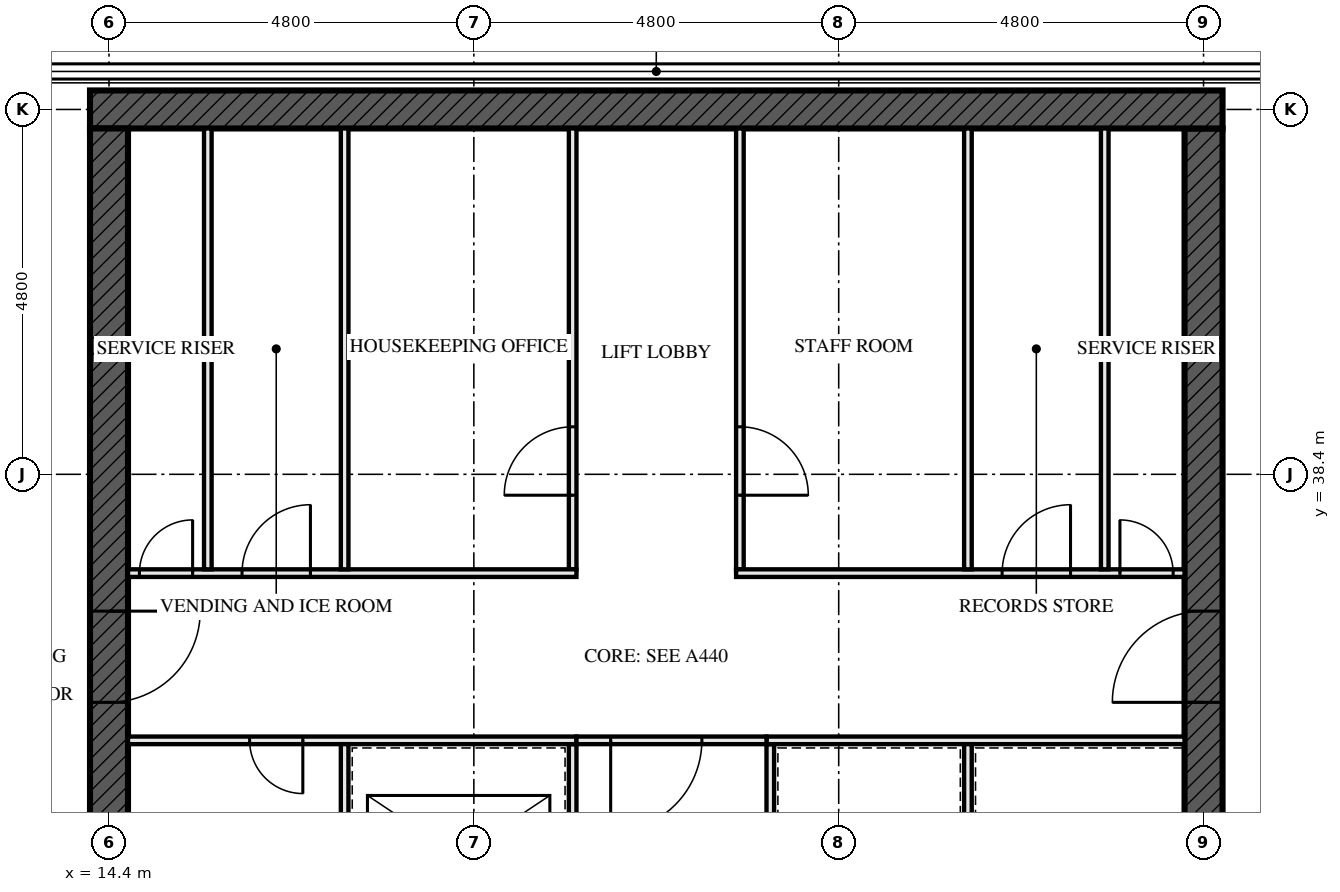
"""IFC4 building model, lengths in metres.
Left out: names, types, materials, properties, quantities, classifications, styles, units other than length and angle.
Written with IfcOpenShell. Run it as: python <this file> out.ifc"""

import sys

from ifc_helpers import new_model, si_unit, direction, frame, frame_2d, origin, place, context, subcontext, project, spatial, rectangle, extrude, element, fill, save


model = new_model("IFC4")
c1 = context("Model", 3, precision=1e-05, world=origin(), true_north=direction((0.0, 1.0)))
c2 = subcontext(c1, "Body", "Model", "MODEL_VIEW")
j1 = project(units=[si_unit("LENGTHUNIT", "METRE"), si_unit("PLANEANGLEUNIT", "RADIAN")], contexts=[c1])
p1 = place(None, origin())
s1 = spatial("IfcSite", under=j1, at=p1, CompositionType="ELEMENT")
p2 = place(p1, origin())
s2 = spatial("IfcBuilding", under=s1, at=p2, CompositionType="ELEMENT")
p3 = place(p2, frame((0.0, 0.0, 243.5)))
s3 = spatial("IfcBuildingStorey", under=s2, at=p3, CompositionType="ELEMENT", Elevation=243.5)
p4 = place(p3, frame((29.05, 43.2, -0.25), z_axis=(0.0, 0.0, 1.0), x_axis=(-1.0, 0.0, 0.0)))
e1 = element("IfcWall", 1, at=p4, inside=s3, PredefinedType="SHEAR", context=c2, shape_type="SweptSolid", body=[
    extrude(rectangle(XDim=14.9, YDim=0.5, at=frame_2d((7.45, 0.0))), origin(), (0.0, 0.0, 1.0), 4.5),
])
p5 = place(p3, frame((14.4, 42.95, -0.25), z_axis=(0.0, 0.0, 1.0), x_axis=(0.0, -1.0, 0.0)))
e2 = element("IfcWall", 2, at=p5, inside=s3, PredefinedType="SHEAR", context=c2, shape_type="SweptSolid", body=[
    extrude(rectangle(XDim=13.9, YDim=0.5, at=frame_2d((6.95, 0.0))), origin(), (0.0, 0.0, 1.0), 4.5),
])
p6 = place(p5, frame((6.35, 0.0, 0.25)))
e3 = element("IfcOpeningElement", 3, at=p6, cuts=e2, PredefinedType="OPENING", context=c2, shape_type="SweptSolid", body=[
    extrude(rectangle(XDim=1.2, YDim=2.1, at=frame_2d((0.6, 1.05))), frame((0.0, 0.26, 0.0), z_axis=(0.0, -1.0, 0.0), x_axis=(1.0, 0.0, 0.0)), (0.0, 0.0, 1.0), 0.521),
])
p7 = place(p3, frame((28.8, 29.05, -0.25), z_axis=(0.0, 0.0, 1.0), x_axis=(0.0, 1.0, 0.0)))
e4 = element("IfcWall", 4, at=p7, inside=s3, PredefinedType="SHEAR", context=c2, shape_type="SweptSolid", body=[
    extrude(rectangle(XDim=13.9, YDim=0.5, at=frame_2d((6.95, 0.0))), origin(), (0.0, 0.0, 1.0), 4.5),
])
p8 = place(p7, frame((6.35, 0.0, 0.25)))
e5 = element("IfcOpeningElement", 5, at=p8, cuts=e4, PredefinedType="OPENING", context=c2, shape_type="SweptSolid", body=[
    extrude(rectangle(XDim=1.2, YDim=2.1, at=frame_2d((0.6, 1.05))), frame((0.0, 0.26, 0.0), z_axis=(0.0, -1.0, 0.0), x_axis=(1.0, 0.0, 0.0)), (0.0, 0.0, 1.0), 0.521),
])
for number, where, z_axis, x_axis in (
    (6, (15.7, 37.15, 0.0), (0.0, 0.0, 1.0), (0.0, 1.0, 0.0)),
    (7, (27.5, 37.15, 0.0), (0.0, 0.0, 1.0), (0.0, 1.0, 0.0)),
):
    element("IfcWall", number, at=place(p3, frame(where, z_axis=z_axis, x_axis=x_axis)), inside=s3, PredefinedType="SOLIDWALL", context=c2, shape_type="SweptSolid", body=[
        extrude(rectangle(XDim=5.8, YDim=0.1, at=frame_2d((2.9, 0.0))), origin(), (0.0, 0.0, 1.0), 4.25),
    ])
p9 = place(p3, frame((20.5, 29.05, 0.0), z_axis=(0.0, 0.0, 1.0), x_axis=(0.0, 1.0, 0.0)))
e8 = element("IfcWall", 8, at=p9, inside=s3, PredefinedType="SOLIDWALL", context=c2, shape_type="SweptSolid", body=[
    extrude(rectangle(XDim=5.8, YDim=0.1, at=frame_2d((2.9, 0.0))), origin(), (0.0, 0.0, 1.0), 4.25),
])
p10 = place(p9, frame((0.8, 0.0, 0.0)))
e9 = element("IfcOpeningElement", 9, at=p10, cuts=e8, PredefinedType="OPENING", context=c2, shape_type="SweptSolid", body=[
    extrude(rectangle(XDim=1.1, YDim=2.3, at=frame_2d((0.55, 1.15))), frame((0.0, 0.061, 0.0), z_axis=(0.0, -1.0, 0.0), x_axis=(1.0, 0.0, 0.0)), (0.0, 0.0, 1.0), 0.121),
])
p11 = place(p9, frame((3.775, 0.0, 0.0)))
e10 = element("IfcOpeningElement", 10, at=p11, cuts=e8, PredefinedType="OPENING", context=c2, shape_type="SweptSolid", body=[
    extrude(rectangle(XDim=1.1, YDim=2.3, at=frame_2d((0.55, 1.15))), frame((0.0, 0.061, 0.0), z_axis=(0.0, -1.0, 0.0), x_axis=(1.0, 0.0, 0.0)), (0.0, 0.0, 1.0), 0.121),
])
p12 = place(p3, frame((20.5, 37.15, 0.0), z_axis=(0.0, 0.0, 1.0), x_axis=(0.0, 1.0, 0.0)))
e11 = element("IfcWall", 11, at=p12, inside=s3, PredefinedType="SOLIDWALL", context=c2, shape_type="SweptSolid", body=[
    extrude(rectangle(XDim=5.8, YDim=0.1, at=frame_2d((2.9, 0.0))), origin(), (0.0, 0.0, 1.0), 4.25),
])
p13 = place(p12, frame((0.975, 0.0, 0.0)))
e12 = element("IfcOpeningElement", 12, at=p13, cuts=e11, PredefinedType="OPENING", context=c2, shape_type="SweptSolid", body=[
    extrude(rectangle(XDim=0.9, YDim=2.1, at=frame_2d((0.45, 1.05))), frame((0.0, 0.061, 0.0), z_axis=(0.0, -1.0, 0.0), x_axis=(1.0, 0.0, 0.0)), (0.0, 0.0, 1.0), 0.121),
])
p14 = place(p3, frame((22.7, 37.15, 0.0), z_axis=(0.0, 0.0, 1.0), x_axis=(0.0, 1.0, 0.0)))
e13 = element("IfcWall", 13, at=p14, inside=s3, PredefinedType="SOLIDWALL", context=c2, shape_type="SweptSolid", body=[
    extrude(rectangle(XDim=5.8, YDim=0.1, at=frame_2d((2.9, 0.0))), origin(), (0.0, 0.0, 1.0), 4.25),
])
p15 = place(p14, frame((0.975, 0.0, 0.0)))
e14 = element("IfcOpeningElement", 14, at=p15, cuts=e13, PredefinedType="OPENING", context=c2, shape_type="SweptSolid", body=[
    extrude(rectangle(XDim=0.9, YDim=2.1, at=frame_2d((0.45, 1.05))), frame((0.0, 0.061, 0.0), z_axis=(0.0, -1.0, 0.0), x_axis=(1.0, 0.0, 0.0)), (0.0, 0.0, 1.0), 0.121),
])
p16 = place(p3, frame((23.1, 29.05, 0.0), z_axis=(0.0, 0.0, 1.0), x_axis=(0.0, 1.0, 0.0)))
e15 = element("IfcWall", 15, at=p16, inside=s3, PredefinedType="SOLIDWALL", context=c2, shape_type="SweptSolid", body=[
    extrude(rectangle(XDim=5.8, YDim=0.1, at=frame_2d((2.9, 0.0))), origin(), (0.0, 0.0, 1.0), 4.25),
])
p17 = place(p16, frame((1.0, 0.0, 0.0)))
e16 = element("IfcOpeningElement", 16, at=p17, cuts=e15, PredefinedType="OPENING", context=c2, shape_type="SweptSolid", body=[
    extrude(rectangle(XDim=0.7, YDim=2.1, at=frame_2d((0.35, 1.05))), frame((0.0, 0.061, 0.0), z_axis=(0.0, -1.0, 0.0), x_axis=(1.0, 0.0, 0.0)), (0.0, 0.0, 1.0), 0.121),
])
p18 = place(p3, frame((14.65, 34.9, 0.0), z_axis=(0.0, 0.0, 1.0), x_axis=(1.0, 0.0, 0.0)))
e17 = element("IfcWall", 17, at=p18, inside=s3, PredefinedType="SOLIDWALL", context=c2, shape_type="SweptSolid", body=[
    extrude(rectangle(XDim=5.9, YDim=0.1, at=frame_2d((2.95, 0.0))), origin(), (0.0, 0.0, 1.0), 4.25),
])
p19 = place(p18, frame((1.6, 0.0, 0.0)))
e18 = element("IfcOpeningElement", 18, at=p19, cuts=e17, PredefinedType="OPENING", context=c2, shape_type="SweptSolid", body=[
    extrude(rectangle(XDim=0.7, YDim=2.1, at=frame_2d((0.35, 1.05))), frame((0.0, 0.061, 0.0), z_axis=(0.0, -1.0, 0.0), x_axis=(1.0, 0.0, 0.0)), (0.0, 0.0, 1.0), 0.121),
])
p20 = place(p3, frame((23.05, 34.9, 0.0), z_axis=(0.0, 0.0, 1.0), x_axis=(1.0, 0.0, 0.0)))
e19 = element("IfcWall", 19, at=p20, inside=s3, PredefinedType="SOLIDWALL", context=c2, shape_type="SweptSolid", body=[
    extrude(rectangle(XDim=5.5, YDim=0.1, at=frame_2d((2.75, 0.0))), origin(), (0.0, 0.0, 1.0), 4.25),
])
p21 = place(p3, frame((14.65, 37.1, 0.0), z_axis=(0.0, 0.0, 1.0), x_axis=(1.0, 0.0, 0.0)))
e20 = element("IfcWall", 20, at=p21, inside=s3, PredefinedType="SOLIDWALL", context=c2, shape_type="SweptSolid", body=[
    extrude(rectangle(XDim=5.9, YDim=0.1, at=frame_2d((2.95, 0.0))), origin(), (0.0, 0.0, 1.0), 4.25),
])
p22 = place(p21, frame((0.15, 0.0, 0.0)))
e21 = element("IfcOpeningElement", 21, at=p22, cuts=e20, PredefinedType="OPENING", context=c2, shape_type="SweptSolid", body=[
    extrude(rectangle(XDim=0.7, YDim=2.1, at=frame_2d((0.35, 1.05))), frame((0.0, 0.061, 0.0), z_axis=(0.0, -1.0, 0.0), x_axis=(1.0, 0.0, 0.0)), (0.0, 0.0, 1.0), 0.121),
])
p23 = place(p21, frame((1.5, 0.0, 0.0)))
e22 = element("IfcOpeningElement", 22, at=p23, cuts=e20, PredefinedType="OPENING", context=c2, shape_type="SweptSolid", body=[
    extrude(rectangle(XDim=0.9, YDim=2.1, at=frame_2d((0.45, 1.05))), frame((0.0, 0.061, 0.0), z_axis=(0.0, -1.0, 0.0), x_axis=(1.0, 0.0, 0.0)), (0.0, 0.0, 1.0), 0.121),
])
p24 = place(p3, frame((22.65, 37.1, 0.0), z_axis=(0.0, 0.0, 1.0), x_axis=(1.0, 0.0, 0.0)))
e23 = element("IfcWall", 23, at=p24, inside=s3, PredefinedType="SOLIDWALL", context=c2, shape_type="SweptSolid", body=[
    extrude(rectangle(XDim=5.9, YDim=0.1, at=frame_2d((2.95, 0.0))), origin(), (0.0, 0.0, 1.0), 4.25),
])
p25 = place(p24, frame((3.5, 0.0, 0.0)))
e24 = element("IfcOpeningElement", 24, at=p25, cuts=e23, PredefinedType="OPENING", context=c2, shape_type="SweptSolid", body=[
    extrude(rectangle(XDim=0.9, YDim=2.1, at=frame_2d((0.45, 1.05))), frame((0.0, 0.061, 0.0), z_axis=(0.0, -1.0, 0.0), x_axis=(1.0, 0.0, 0.0)), (0.0, 0.0, 1.0), 0.121),
])
p26 = place(p24, frame((5.05, 0.0, 0.0)))
e25 = element("IfcOpeningElement", 25, at=p26, cuts=e23, PredefinedType="OPENING", context=c2, shape_type="SweptSolid", body=[
    extrude(rectangle(XDim=0.7, YDim=2.1, at=frame_2d((0.35, 1.05))), frame((0.0, 0.061, 0.0), z_axis=(0.0, -1.0, 0.0), x_axis=(1.0, 0.0, 0.0)), (0.0, 0.0, 1.0), 0.121),
])
p27 = place(p3, frame((20.55, 34.9, 0.0), z_axis=(0.0, 0.0, 1.0), x_axis=(1.0, 0.0, 0.0)))
e26 = element("IfcWall", 26, at=p27, inside=s3, PredefinedType="SOLIDWALL", context=c2, shape_type="SweptSolid", body=[
    extrude(rectangle(XDim=2.5, YDim=0.1, at=frame_2d((1.25, 0.0))), origin(), (0.0, 0.0, 1.0), 4.25),
])
p28 = place(p27, frame((0.45, 0.0, 0.0)))
e27 = element("IfcOpeningElement", 27, at=p28, cuts=e26, PredefinedType="OPENING", context=c2, shape_type="SweptSolid", body=[
    extrude(rectangle(XDim=1.2, YDim=2.1, at=frame_2d((0.6, 1.05))), frame((0.0, 0.061, 0.0), z_axis=(0.0, -1.0, 0.0), x_axis=(1.0, 0.0, 0.0)), (0.0, 0.0, 1.0), 0.121),
])
for number, where, z_axis, x_axis in (
    (28, (17.5, 29.05, 0.0), (0.0, 0.0, 1.0), (0.0, 1.0, 0.0)),
    (29, (17.5, 37.15, 0.0), (0.0, 0.0, 1.0), (0.0, 1.0, 0.0)),
    (30, (25.7, 37.15, 0.0), (0.0, 0.0, 1.0), (0.0, 1.0, 0.0)),
):
    element("IfcWall", number, at=place(p3, frame(where, z_axis=z_axis, x_axis=x_axis)), inside=s3, PredefinedType="SOLIDWALL", context=c2, shape_type="SweptSolid", body=[
        extrude(rectangle(XDim=5.8, YDim=0.1, at=frame_2d((2.9, 0.0))), origin(), (0.0, 0.0, 1.0), 4.25),
    ])
p29 = place(p3, frame((25.7, 31.95, 0.0), z_axis=(0.0, 0.0, 1.0), x_axis=(0.0, 1.0, 0.0)))
e31 = element("IfcWall", 31, at=p29, inside=s3, PredefinedType="SOLIDWALL", context=c2, shape_type="SweptSolid", body=[
    extrude(rectangle(XDim=2.9, YDim=0.1, at=frame_2d((1.45, 0.0))), origin(), (0.0, 0.0, 1.0), 4.25),
])
p30 = place(p13, origin())
e32 = element("IfcDoor", 32, at=p30, inside=s3, OperationType="SINGLE_SWING_RIGHT", PredefinedType="DOOR", context=c2, shape_type="SweptSolid", body=[
    extrude(rectangle(XDim=0.9, YDim=2.1, at=frame_2d((0.45, 1.05))), frame((0.0, 0.027, 0.0), z_axis=(0.0, -1.0, 0.0), x_axis=(1.0, 0.0, 0.0)), (0.0, 0.0, 1.0), 0.054),
])
fill(e12, e32)
p31 = place(p15, frame((0.9, 0.0, 0.0), z_axis=(0.0, 0.0, 1.0), x_axis=(-1.0, 0.0, 0.0)))
e33 = element("IfcDoor", 33, at=p31, inside=s3, OperationType="SINGLE_SWING_LEFT", PredefinedType="DOOR", context=c2, shape_type="SweptSolid", body=[
    extrude(rectangle(XDim=0.9, YDim=2.1, at=frame_2d((0.45, 1.05))), frame((0.0, 0.027, 0.0), z_axis=(0.0, -1.0, 0.0), x_axis=(1.0, 0.0, 0.0)), (0.0, 0.0, 1.0), 0.054),
])
fill(e14, e33)
p32 = place(p19, frame((0.7, 0.0, 0.0), z_axis=(0.0, 0.0, 1.0), x_axis=(-1.0, 0.0, 0.0)))
e34 = element("IfcDoor", 34, at=p32, inside=s3, OperationType="SINGLE_SWING_RIGHT", PredefinedType="DOOR", context=c2, shape_type="SweptSolid", body=[
    extrude(rectangle(XDim=0.7, YDim=2.1, at=frame_2d((0.35, 1.05))), frame((0.0, 0.027, 0.0), z_axis=(0.0, -1.0, 0.0), x_axis=(1.0, 0.0, 0.0)), (0.0, 0.0, 1.0), 0.054),
])
fill(e18, e34)
p33 = place(p22, origin())
e35 = element("IfcDoor", 35, at=p33, inside=s3, OperationType="SINGLE_SWING_LEFT", PredefinedType="DOOR", context=c2, shape_type="SweptSolid", body=[
    extrude(rectangle(XDim=0.7, YDim=2.1, at=frame_2d((0.35, 1.05))), frame((0.0, 0.027, 0.0), z_axis=(0.0, -1.0, 0.0), x_axis=(1.0, 0.0, 0.0)), (0.0, 0.0, 1.0), 0.054),
])
fill(e21, e35)
p34 = place(p23, origin())
e36 = element("IfcDoor", 36, at=p34, inside=s3, OperationType="SINGLE_SWING_LEFT", PredefinedType="DOOR", context=c2, shape_type="SweptSolid", body=[
    extrude(rectangle(XDim=0.9, YDim=2.1, at=frame_2d((0.45, 1.05))), frame((0.0, 0.027, 0.0), z_axis=(0.0, -1.0, 0.0), x_axis=(1.0, 0.0, 0.0)), (0.0, 0.0, 1.0), 0.054),
])
fill(e22, e36)
p35 = place(p25, origin())
e37 = element("IfcDoor", 37, at=p35, inside=s3, OperationType="SINGLE_SWING_LEFT", PredefinedType="DOOR", context=c2, shape_type="SweptSolid", body=[
    extrude(rectangle(XDim=0.9, YDim=2.1, at=frame_2d((0.45, 1.05))), frame((0.0, 0.027, 0.0), z_axis=(0.0, -1.0, 0.0), x_axis=(1.0, 0.0, 0.0)), (0.0, 0.0, 1.0), 0.054),
])
fill(e24, e37)
p36 = place(p26, origin())
e38 = element("IfcDoor", 38, at=p36, inside=s3, OperationType="SINGLE_SWING_RIGHT", PredefinedType="DOOR", context=c2, shape_type="SweptSolid", body=[
    extrude(rectangle(XDim=0.7, YDim=2.1, at=frame_2d((0.35, 1.05))), frame((0.0, 0.027, 0.0), z_axis=(0.0, -1.0, 0.0), x_axis=(1.0, 0.0, 0.0)), (0.0, 0.0, 1.0), 0.054),
])
fill(e25, e38)
p37 = place(p28, frame((1.2, 0.0, 0.0), z_axis=(0.0, 0.0, 1.0), x_axis=(-1.0, 0.0, 0.0)))
e39 = element("IfcDoor", 39, at=p37, inside=s3, OperationType="SINGLE_SWING_LEFT", PredefinedType="DOOR", context=c2, shape_type="SweptSolid", body=[
    extrude(rectangle(XDim=1.2, YDim=2.1, at=frame_2d((0.6, 1.05))), frame((0.0, 0.027, 0.0), z_axis=(0.0, -1.0, 0.0), x_axis=(1.0, 0.0, 0.0)), (0.0, 0.0, 1.0), 0.054),
])
fill(e27, e39)
p38 = place(p6, origin())
e40 = element("IfcDoor", 40, at=p38, inside=s3, OperationType="SINGLE_SWING_LEFT", PredefinedType="DOOR", context=c2, shape_type="SweptSolid", body=[
    extrude(rectangle(XDim=1.2, YDim=2.1, at=frame_2d((0.6, 1.05))), frame((0.0, 0.027, 0.0), z_axis=(0.0, -1.0, 0.0), x_axis=(1.0, 0.0, 0.0)), (0.0, 0.0, 1.0), 0.054),
])
fill(e3, e40)
p39 = place(p8, origin())
e41 = element("IfcDoor", 41, at=p39, inside=s3, OperationType="SINGLE_SWING_LEFT", PredefinedType="DOOR", context=c2, shape_type="SweptSolid", body=[
    extrude(rectangle(XDim=1.2, YDim=2.1, at=frame_2d((0.6, 1.05))), frame((0.0, 0.027, 0.0), z_axis=(0.0, -1.0, 0.0), x_axis=(1.0, 0.0, 0.0)), (0.0, 0.0, 1.0), 0.054),
])
fill(e5, e41)
save(model, sys.argv[1])
